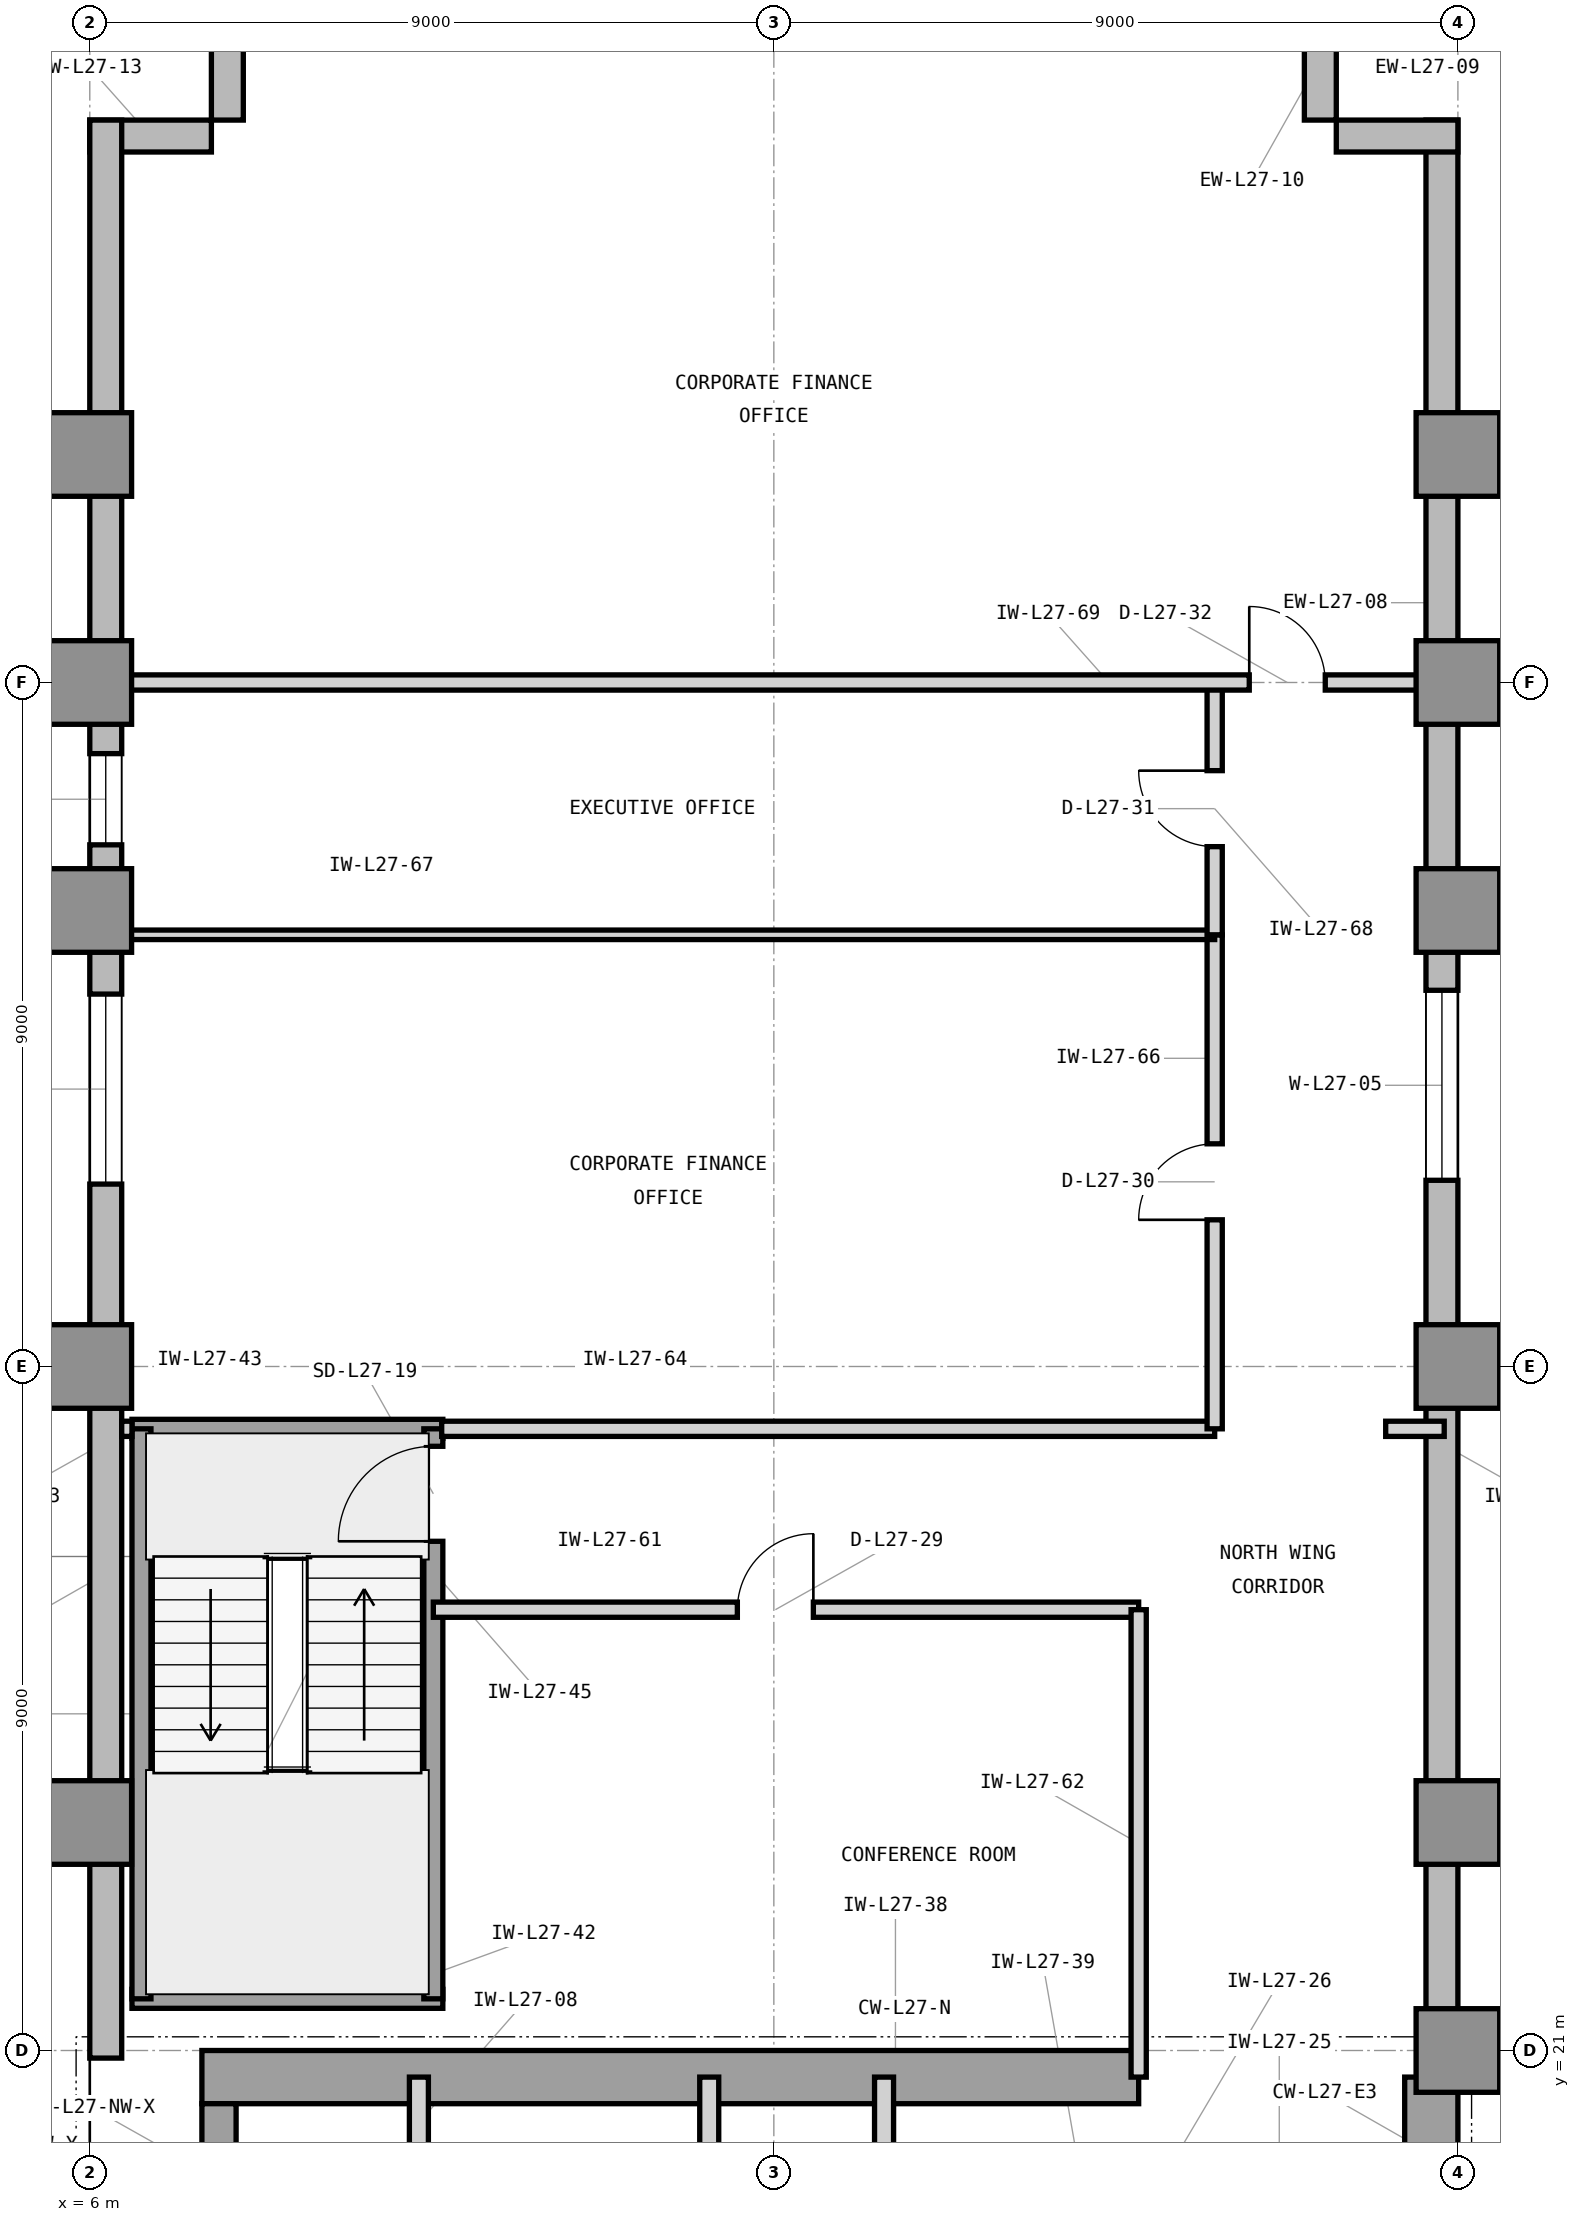
"""IFC4 building model, lengths in metres.
Left out: names, types, materials, properties, quantities, classifications, styles, units other than length and angle.
Written with IfcOpenShell. Run it as: python <this file> out.ifc"""

import sys

from ifc_helpers import new_model, si_unit, direction, frame, frame_2d, origin, origin_2d, place, context, subcontext, project, spatial, rectangle, extrude, element, fill, save


model = new_model("IFC4")
c1 = context("Model", 3, precision=1e-05, world=origin(), true_north=direction((0.0, 1.0)))
c2 = subcontext(c1, "Body", "Model", "MODEL_VIEW")
j1 = project(units=[si_unit("LENGTHUNIT", "METRE"), si_unit("PLANEANGLEUNIT", "RADIAN")], contexts=[c1])
p1 = place(None, origin())
s1 = spatial("IfcSite", under=j1, at=p1, CompositionType="ELEMENT")
p2 = place(p1, origin())
s2 = spatial("IfcBuilding", under=s1, at=p2, CompositionType="ELEMENT")
p3 = place(p2, frame((0.0, 0.0, 116.7)))
s3 = spatial("IfcBuildingStorey", under=s2, at=p3, CompositionType="ELEMENT", Elevation=116.7)
p4 = place(p3, frame((7.475, 20.65, 0.0), z_axis=(0.0, 0.0, 1.0), x_axis=(1.0, 0.0, 0.0)))
e1 = element("IfcWall", 1, at=p4, inside=s3, PredefinedType="SHEAR", context=c2, shape_type="SweptSolid", body=[
    extrude(rectangle(XDim=12.325, YDim=0.7, at=frame_2d((6.163, 0.0))), origin(), (0.0, 0.0, 1.0), 3.9),
])
p5 = place(p3, frame((23.65, 16.6, 0.0), z_axis=(0.0, 0.0, 1.0), x_axis=(0.0, 1.0, 0.0)))
e2 = element("IfcWall", 2, at=p5, inside=s3, PredefinedType="SHEAR", context=c2, shape_type="SweptSolid", body=[
    extrude(rectangle(XDim=4.05, YDim=0.7, at=frame_2d((2.025, 0.0))), origin(), (0.0, 0.0, 1.0), 3.9),
])
p6 = place(p3, frame((7.7, 19.575, 0.0), z_axis=(0.0, 0.0, 1.0), x_axis=(0.0, 1.0, 0.0)))
e3 = element("IfcWall", 3, at=p6, inside=s3, PredefinedType="SHEAR", context=c2, shape_type="SweptSolid", body=[
    extrude(rectangle(XDim=0.725, YDim=0.45, at=frame_2d((0.363, 0.0))), origin(), (0.0, 0.0, 1.0), 3.9),
])
for number, where, z_axis, x_axis in (
    (4, (24.0, 21.0, 0.0), (0.0, 0.0, 1.0), (1.0, 0.0, 0.0)),
    (5, (6.0, 24.0, 0.0), (0.0, 0.0, 1.0), (1.0, 0.0, 0.0)),
    (6, (24.0, 24.0, 0.0), (0.0, 0.0, 1.0), (1.0, 0.0, 0.0)),
    (7, (6.0, 30.0, 0.0), (0.0, 0.0, 1.0), (1.0, 0.0, 0.0)),
    (8, (24.0, 30.0, 0.0), (0.0, 0.0, 1.0), (1.0, 0.0, 0.0)),
    (9, (6.0, 36.0, 0.0), (0.0, 0.0, 1.0), (1.0, 0.0, 0.0)),
    (10, (24.0, 36.0, 0.0), (0.0, 0.0, 1.0), (1.0, 0.0, 0.0)),
    (11, (6.0, 39.0, 0.0), (0.0, 0.0, 1.0), (1.0, 0.0, 0.0)),
    (12, (24.0, 39.0, 0.0), (0.0, 0.0, 1.0), (1.0, 0.0, 0.0)),
    (13, (6.0, 42.0, 0.0), (0.0, 0.0, 1.0), (1.0, 0.0, 0.0)),
    (14, (24.0, 42.0, 0.0), (0.0, 0.0, 1.0), (1.0, 0.0, 0.0)),
):
    element("IfcColumn", number, at=place(p3, frame(where, z_axis=z_axis, x_axis=x_axis)), inside=s3, PredefinedType="COLUMN", context=c2, shape_type="SweptSolid", body=[
        extrude(rectangle(XDim=1.1, YDim=1.1, at=origin_2d()), origin(), (0.0, 0.0, 1.0), 3.9),
    ])
p7 = place(p3, frame((61.4, 20.79, 0.0), z_axis=(0.0, 0.0, 1.0), x_axis=(-1.0, 0.0, 0.0)))
e15 = element("IfcWall", 15, at=p7, inside=s3, PredefinedType="STANDARD", context=c2, shape_type="SweptSolid", body=[
    extrude(rectangle(XDim=37.4, YDim=0.42, at=frame_2d((18.7, 0.0))), origin(), (0.0, 0.0, 1.0), 3.7),
])
p8 = place(p7, frame((35.222, 0.0, 0.85)))
e16 = element("IfcOpeningElement", 16, at=p8, cuts=e15, PredefinedType="OPENING", context=c2, shape_type="SweptSolid", body=[
    extrude(rectangle(XDim=1.2, YDim=2.25, at=frame_2d((0.6, 1.125))), frame((0.0, 0.22, 0.0), z_axis=(0.0, -1.0, 0.0), x_axis=(1.0, 0.0, 0.0)), (0.0, 0.0, 1.0), 0.44),
])
p9 = place(p7, frame((29.386, 0.0, 0.85)))
e17 = element("IfcOpeningElement", 17, at=p9, cuts=e15, PredefinedType="OPENING", context=c2, shape_type="SweptSolid", body=[
    extrude(rectangle(XDim=2.5, YDim=2.25, at=frame_2d((1.25, 1.125))), frame((0.0, 0.22, 0.0), z_axis=(0.0, -1.0, 0.0), x_axis=(1.0, 0.0, 0.0)), (0.0, 0.0, 1.0), 0.44),
])
p10 = place(p7, frame((20.386, 0.0, 0.85)))
e18 = element("IfcOpeningElement", 18, at=p10, cuts=e15, PredefinedType="OPENING", context=c2, shape_type="SweptSolid", body=[
    extrude(rectangle(XDim=2.5, YDim=2.25, at=frame_2d((1.25, 1.125))), frame((0.0, 0.22, 0.0), z_axis=(0.0, -1.0, 0.0), x_axis=(1.0, 0.0, 0.0)), (0.0, 0.0, 1.0), 0.44),
])
p11 = place(p7, frame((8.336, 0.0, 0.85)))
e19 = element("IfcOpeningElement", 19, at=p11, cuts=e15, PredefinedType="OPENING", context=c2, shape_type="SweptSolid", body=[
    extrude(rectangle(XDim=1.2, YDim=2.25, at=frame_2d((0.6, 1.125))), frame((0.0, 0.22, 0.0), z_axis=(0.0, -1.0, 0.0), x_axis=(1.0, 0.0, 0.0)), (0.0, 0.0, 1.0), 0.44),
])
p12 = place(p3, frame((23.79, 21.0, 0.0), z_axis=(0.0, 0.0, 1.0), x_axis=(0.0, 1.0, 0.0)))
e20 = element("IfcWall", 20, at=p12, inside=s3, PredefinedType="STANDARD", context=c2, shape_type="SweptSolid", body=[
    extrude(rectangle(XDim=25.4, YDim=0.42, at=frame_2d((12.7, 0.0))), origin(), (0.0, 0.0, 1.0), 3.7),
])
p13 = place(p12, frame((11.45, 0.0, 0.85)))
e21 = element("IfcOpeningElement", 21, at=p13, cuts=e20, PredefinedType="OPENING", context=c2, shape_type="SweptSolid", body=[
    extrude(rectangle(XDim=2.5, YDim=2.25, at=frame_2d((1.25, 1.125))), frame((0.0, 0.22, 0.0), z_axis=(0.0, -1.0, 0.0), x_axis=(1.0, 0.0, 0.0)), (0.0, 0.0, 1.0), 0.44),
])
for number, where, z_axis, x_axis in (
    (22, (24.0, 46.19, 0.0), (0.0, 0.0, 1.0), (-1.0, 0.0, 0.0)),
    (23, (22.19, 46.4, 0.0), (0.0, 0.0, 1.0), (0.0, 1.0, 0.0)),
    (24, (7.81, 48.0, 0.0), (0.0, 0.0, 1.0), (0.0, -1.0, 0.0)),
    (25, (7.6, 46.19, 0.0), (0.0, 0.0, 1.0), (-1.0, 0.0, 0.0)),
):
    element("IfcWall", number, at=place(p3, frame(where, z_axis=z_axis, x_axis=x_axis)), inside=s3, PredefinedType="STANDARD", context=c2, shape_type="SweptSolid", body=[
        extrude(rectangle(XDim=1.6, YDim=0.42, at=frame_2d((0.8, 0.0))), origin(), (0.0, 0.0, 1.0), 3.7),
    ])
p14 = place(p3, frame((6.21, 46.4, 0.0), z_axis=(0.0, 0.0, 1.0), x_axis=(0.0, -1.0, 0.0)))
e26 = element("IfcWall", 26, at=p14, inside=s3, PredefinedType="STANDARD", context=c2, shape_type="SweptSolid", body=[
    extrude(rectangle(XDim=25.5, YDim=0.42, at=frame_2d((12.75, 0.0))), origin(), (0.0, 0.0, 1.0), 3.7),
])
p15 = place(p14, frame((11.5, 0.0, 0.85)))
e27 = element("IfcOpeningElement", 27, at=p15, cuts=e26, PredefinedType="OPENING", context=c2, shape_type="SweptSolid", body=[
    extrude(rectangle(XDim=2.5, YDim=2.25, at=frame_2d((1.25, 1.125))), frame((0.0, 0.22, 0.0), z_axis=(0.0, -1.0, 0.0), x_axis=(1.0, 0.0, 0.0)), (0.0, 0.0, 1.0), 0.44),
])
p16 = place(p14, frame((8.336, 0.0, 0.85)))
e28 = element("IfcOpeningElement", 28, at=p16, cuts=e26, PredefinedType="OPENING", context=c2, shape_type="SweptSolid", body=[
    extrude(rectangle(XDim=1.2, YDim=2.25, at=frame_2d((0.6, 1.125))), frame((0.0, 0.22, 0.0), z_axis=(0.0, -1.0, 0.0), x_axis=(1.0, 0.0, 0.0)), (0.0, 0.0, 1.0), 0.44),
])
p17 = place(p3, frame((10.33, 19.45, 0.0), z_axis=(0.0, 0.0, 1.0), x_axis=(0.0, 1.0, 0.0)))
e29 = element("IfcWall", 29, at=p17, inside=s3, PredefinedType="PARTITIONING", context=c2, shape_type="SweptSolid", body=[
    extrude(rectangle(XDim=1.2, YDim=0.25, at=frame_2d((0.6, 0.0))), origin(), (0.0, 0.0, 1.0), 2.917),
])
for number, where, z_axis, x_axis in (
    (30, (14.15, 16.7, 0.0), (0.0, 0.0, 1.0), (0.0, 1.0, 0.0)),
    (31, (16.45, 16.7, 0.0), (0.0, 0.0, 1.0), (0.0, 1.0, 0.0)),
):
    element("IfcWall", number, at=place(p3, frame(where, z_axis=z_axis, x_axis=x_axis)), inside=s3, PredefinedType="PARTITIONING", context=c2, shape_type="SweptSolid", body=[
        extrude(rectangle(XDim=3.95, YDim=0.25, at=frame_2d((1.975, 0.0))), origin(), (0.0, 0.0, 1.0), 3.69),
    ])
for number, where, z_axis, x_axis in (
    (32, (6.555, 21.68, 0.0), (0.0, 0.0, 1.0), (1.0, 0.0, 0.0)),
    (33, (6.555, 29.18, 0.0), (0.0, 0.0, 1.0), (1.0, 0.0, 0.0)),
):
    element("IfcWall", number, at=place(p3, frame(where, z_axis=z_axis, x_axis=x_axis)), inside=s3, PredefinedType="SHEAR", context=c2, shape_type="SweptSolid", body=[
        extrude(rectangle(XDim=4.09, YDim=0.25, at=frame_2d((2.045, 0.0))), origin(), (0.0, 0.0, 1.0), 3.9),
    ])
p18 = place(p3, frame((6.68, 21.68, 0.0), z_axis=(0.0, 0.0, 1.0), x_axis=(0.0, 1.0, 0.0)))
e34 = element("IfcWall", 34, at=p18, inside=s3, PredefinedType="SHEAR", context=c2, shape_type="SweptSolid", body=[
    extrude(rectangle(XDim=7.5, YDim=0.25, at=frame_2d((3.75, 0.0))), origin(), (0.0, 0.0, 1.0), 3.9),
])
p19 = place(p3, frame((10.52, 21.68, 0.0), z_axis=(0.0, 0.0, 1.0), x_axis=(0.0, 1.0, 0.0)))
e35 = element("IfcWall", 35, at=p19, inside=s3, PredefinedType="SHEAR", context=c2, shape_type="SweptSolid", body=[
    extrude(rectangle(XDim=7.5, YDim=0.25, at=frame_2d((3.75, 0.0))), origin(), (0.0, 0.0, 1.0), 3.9),
])
p20 = place(p19, frame((6.02, 0.0, 0.0)))
e36 = element("IfcOpeningElement", 36, at=p20, cuts=e35, PredefinedType="OPENING", context=c2, shape_type="SweptSolid", body=[
    extrude(rectangle(XDim=1.25, YDim=2.2, at=frame_2d((0.625, 1.1))), frame((0.0, 0.135, 0.0), z_axis=(0.0, -1.0, 0.0), x_axis=(1.0, 0.0, 0.0)), (0.0, 0.0, 1.0), 0.27),
])
p21 = place(p3, frame((10.52, 26.8, 0.0), z_axis=(0.0, 0.0, 1.0), x_axis=(1.0, 0.0, 0.0)))
e37 = element("IfcWall", 37, at=p21, inside=s3, PredefinedType="PARTITIONING", context=c2, shape_type="SweptSolid", body=[
    extrude(rectangle(XDim=9.28, YDim=0.2, at=frame_2d((4.64, 0.0))), origin(), (0.0, 0.0, 1.0), 3.69),
])
p22 = place(p21, frame((4.0, 0.0, 0.0)))
e38 = element("IfcOpeningElement", 38, at=p22, cuts=e37, PredefinedType="OPENING", context=c2, shape_type="SweptSolid", body=[
    extrude(rectangle(XDim=1.0, YDim=2.15, at=frame_2d((0.5, 1.075))), frame((0.0, 0.11, 0.0), z_axis=(0.0, -1.0, 0.0), x_axis=(1.0, 0.0, 0.0)), (0.0, 0.0, 1.0), 0.22),
])
p23 = place(p3, frame((19.8, 20.65, 0.0), z_axis=(0.0, 0.0, 1.0), x_axis=(0.0, 1.0, 0.0)))
e39 = element("IfcWall", 39, at=p23, inside=s3, PredefinedType="PARTITIONING", context=c2, shape_type="SweptSolid", body=[
    extrude(rectangle(XDim=6.15, YDim=0.2, at=frame_2d((3.075, 0.0))), origin(), (0.0, 0.0, 1.0), 3.69),
])
p24 = place(p3, frame((6.42, 29.18, 0.0), z_axis=(0.0, 0.0, 1.0), x_axis=(1.0, 0.0, 0.0)))
e40 = element("IfcWall", 40, at=p24, inside=s3, PredefinedType="PARTITIONING", context=c2, shape_type="SweptSolid", body=[
    extrude(rectangle(XDim=0.135, YDim=0.2, at=frame_2d((0.067, 0.0))), origin(), (0.0, 0.0, 1.0), 3.69),
])
p25 = place(p3, frame((10.63, 29.18, 0.0), z_axis=(0.0, 0.0, 1.0), x_axis=(1.0, 0.0, 0.0)))
e41 = element("IfcWall", 41, at=p25, inside=s3, PredefinedType="PARTITIONING", context=c2, shape_type="SweptSolid", body=[
    extrude(rectangle(XDim=10.17, YDim=0.2, at=frame_2d((5.085, 0.0))), origin(), (0.0, 0.0, 1.0), 3.69),
])
p26 = place(p3, frame((23.05, 29.18, 0.0), z_axis=(0.0, 0.0, 1.0), x_axis=(1.0, 0.0, 0.0)))
e42 = element("IfcWall", 42, at=p26, inside=s3, PredefinedType="PARTITIONING", context=c2, shape_type="SweptSolid", body=[
    extrude(rectangle(XDim=0.77, YDim=0.2, at=frame_2d((0.385, 0.0))), origin(), (0.0, 0.0, 1.0), 3.69),
])
p27 = place(p3, frame((20.8, 29.18, 0.0), z_axis=(0.0, 0.0, 1.0), x_axis=(0.0, 1.0, 0.0)))
e43 = element("IfcWall", 43, at=p27, inside=s3, PredefinedType="PARTITIONING", context=c2, shape_type="SweptSolid", body=[
    extrude(rectangle(XDim=6.5, YDim=0.2, at=frame_2d((3.25, 0.0))), origin(), (0.0, 0.0, 1.0), 3.69),
])
p28 = place(p27, frame((2.75, 0.0, 0.0)))
e44 = element("IfcOpeningElement", 44, at=p28, cuts=e43, PredefinedType="OPENING", context=c2, shape_type="SweptSolid", body=[
    extrude(rectangle(XDim=1.0, YDim=2.15, at=frame_2d((0.5, 1.075))), frame((0.0, 0.11, 0.0), z_axis=(0.0, -1.0, 0.0), x_axis=(1.0, 0.0, 0.0)), (0.0, 0.0, 1.0), 0.22),
])
p29 = place(p3, frame((6.18, 35.68, 0.0), z_axis=(0.0, 0.0, 1.0), x_axis=(1.0, 0.0, 0.0)))
e45 = element("IfcWall", 45, at=p29, inside=s3, PredefinedType="PARTITIONING", context=c2, shape_type="SweptSolid", body=[
    extrude(rectangle(XDim=14.62, YDim=0.125, at=frame_2d((7.31, 0.0))), origin(), (0.0, 0.0, 1.0), 3.69),
])
p30 = place(p3, frame((20.8, 35.68, 0.0), z_axis=(0.0, 0.0, 1.0), x_axis=(0.0, 1.0, 0.0)))
e46 = element("IfcWall", 46, at=p30, inside=s3, PredefinedType="PARTITIONING", context=c2, shape_type="SweptSolid", body=[
    extrude(rectangle(XDim=3.32, YDim=0.2, at=frame_2d((1.66, 0.0))), origin(), (0.0, 0.0, 1.0), 3.69),
])
p31 = place(p30, frame((1.16, 0.0, 0.0)))
e47 = element("IfcOpeningElement", 47, at=p31, cuts=e46, PredefinedType="OPENING", context=c2, shape_type="SweptSolid", body=[
    extrude(rectangle(XDim=1.0, YDim=2.15, at=frame_2d((0.5, 1.075))), frame((0.0, 0.11, 0.0), z_axis=(0.0, -1.0, 0.0), x_axis=(1.0, 0.0, 0.0)), (0.0, 0.0, 1.0), 0.22),
])
p32 = place(p3, frame((6.18, 39.0, 0.0), z_axis=(0.0, 0.0, 1.0), x_axis=(1.0, 0.0, 0.0)))
e48 = element("IfcWall", 48, at=p32, inside=s3, PredefinedType="PARTITIONING", context=c2, shape_type="SweptSolid", body=[
    extrude(rectangle(XDim=17.64, YDim=0.2, at=frame_2d((8.82, 0.0))), origin(), (0.0, 0.0, 1.0), 2.917),
])
p33 = place(p32, frame((15.075, 0.0, 0.0)))
e49 = element("IfcOpeningElement", 49, at=p33, cuts=e48, PredefinedType="OPENING", context=c2, shape_type="SweptSolid", body=[
    extrude(rectangle(XDim=1.0, YDim=2.15, at=frame_2d((0.5, 1.075))), frame((0.0, 0.11, 0.0), z_axis=(0.0, -1.0, 0.0), x_axis=(1.0, 0.0, 0.0)), (0.0, 0.0, 1.0), 0.22),
])
p34 = place(p13, origin())
e50 = element("IfcWindow", 50, at=p34, inside=s3, PartitioningType="SINGLE_PANEL", PredefinedType="WINDOW", context=c2, shape_type="SweptSolid", body=[
    extrude(rectangle(XDim=2.5, YDim=2.25, at=frame_2d((1.25, 1.125))), frame((0.0, 0.11, 0.0), z_axis=(0.0, -1.0, 0.0), x_axis=(1.0, 0.0, 0.0)), (0.0, 0.0, 1.0), 0.06),
])
fill(e21, e50)
p35 = place(p15, origin())
e51 = element("IfcWindow", 51, at=p35, inside=s3, PartitioningType="SINGLE_PANEL", PredefinedType="WINDOW", context=c2, shape_type="SweptSolid", body=[
    extrude(rectangle(XDim=2.5, YDim=2.25, at=frame_2d((1.25, 1.125))), frame((0.0, 0.11, 0.0), z_axis=(0.0, -1.0, 0.0), x_axis=(1.0, 0.0, 0.0)), (0.0, 0.0, 1.0), 0.06),
])
fill(e27, e51)
p36 = place(p20, origin())
e52 = element("IfcDoor", 52, at=p36, inside=s3, OperationType="SINGLE_SWING_LEFT", PredefinedType="DOOR", context=c2, shape_type="SweptSolid", body=[
    extrude(rectangle(XDim=1.25, YDim=2.2, at=frame_2d((0.625, 1.1))), frame((0.0, 0.025, 0.0), z_axis=(0.0, -1.0, 0.0), x_axis=(1.0, 0.0, 0.0)), (0.0, 0.0, 1.0), 0.05),
])
fill(e36, e52)
p37 = place(p22, origin())
e53 = element("IfcDoor", 53, at=p37, inside=s3, OperationType="SINGLE_SWING_RIGHT", PredefinedType="DOOR", context=c2, shape_type="SweptSolid", body=[
    extrude(rectangle(XDim=1.0, YDim=2.15, at=frame_2d((0.5, 1.075))), frame((0.0, 0.025, 0.0), z_axis=(0.0, -1.0, 0.0), x_axis=(1.0, 0.0, 0.0)), (0.0, 0.0, 1.0), 0.05),
])
fill(e38, e53)
p38 = place(p28, origin())
e54 = element("IfcDoor", 54, at=p38, inside=s3, OperationType="SINGLE_SWING_LEFT", PredefinedType="DOOR", context=c2, shape_type="SweptSolid", body=[
    extrude(rectangle(XDim=1.0, YDim=2.15, at=frame_2d((0.5, 1.075))), frame((0.0, 0.025, 0.0), z_axis=(0.0, -1.0, 0.0), x_axis=(1.0, 0.0, 0.0)), (0.0, 0.0, 1.0), 0.05),
])
fill(e44, e54)
p39 = place(p31, origin())
e55 = element("IfcDoor", 55, at=p39, inside=s3, OperationType="SINGLE_SWING_RIGHT", PredefinedType="DOOR", context=c2, shape_type="SweptSolid", body=[
    extrude(rectangle(XDim=1.0, YDim=2.15, at=frame_2d((0.5, 1.075))), frame((0.0, 0.025, 0.0), z_axis=(0.0, -1.0, 0.0), x_axis=(1.0, 0.0, 0.0)), (0.0, 0.0, 1.0), 0.05),
])
fill(e47, e55)
p40 = place(p33, origin())
e56 = element("IfcDoor", 56, at=p40, inside=s3, OperationType="SINGLE_SWING_LEFT", PredefinedType="DOOR", context=c2, shape_type="SweptSolid", body=[
    extrude(rectangle(XDim=1.0, YDim=2.15, at=frame_2d((0.5, 1.075))), frame((0.0, 0.025, 0.0), z_axis=(0.0, -1.0, 0.0), x_axis=(1.0, 0.0, 0.0)), (0.0, 0.0, 1.0), 0.05),
])
fill(e49, e56)
p41 = place(p16, origin())
e57 = element("IfcWindow", 57, at=p41, inside=s3, PartitioningType="SINGLE_PANEL", PredefinedType="WINDOW", context=c2, shape_type="SweptSolid", body=[
    extrude(rectangle(XDim=1.2, YDim=2.25, at=frame_2d((0.6, 1.125))), frame((0.0, 0.11, 0.0), z_axis=(0.0, -1.0, 0.0), x_axis=(1.0, 0.0, 0.0)), (0.0, 0.0, 1.0), 0.06),
])
fill(e28, e57)
save(model, sys.argv[1])
